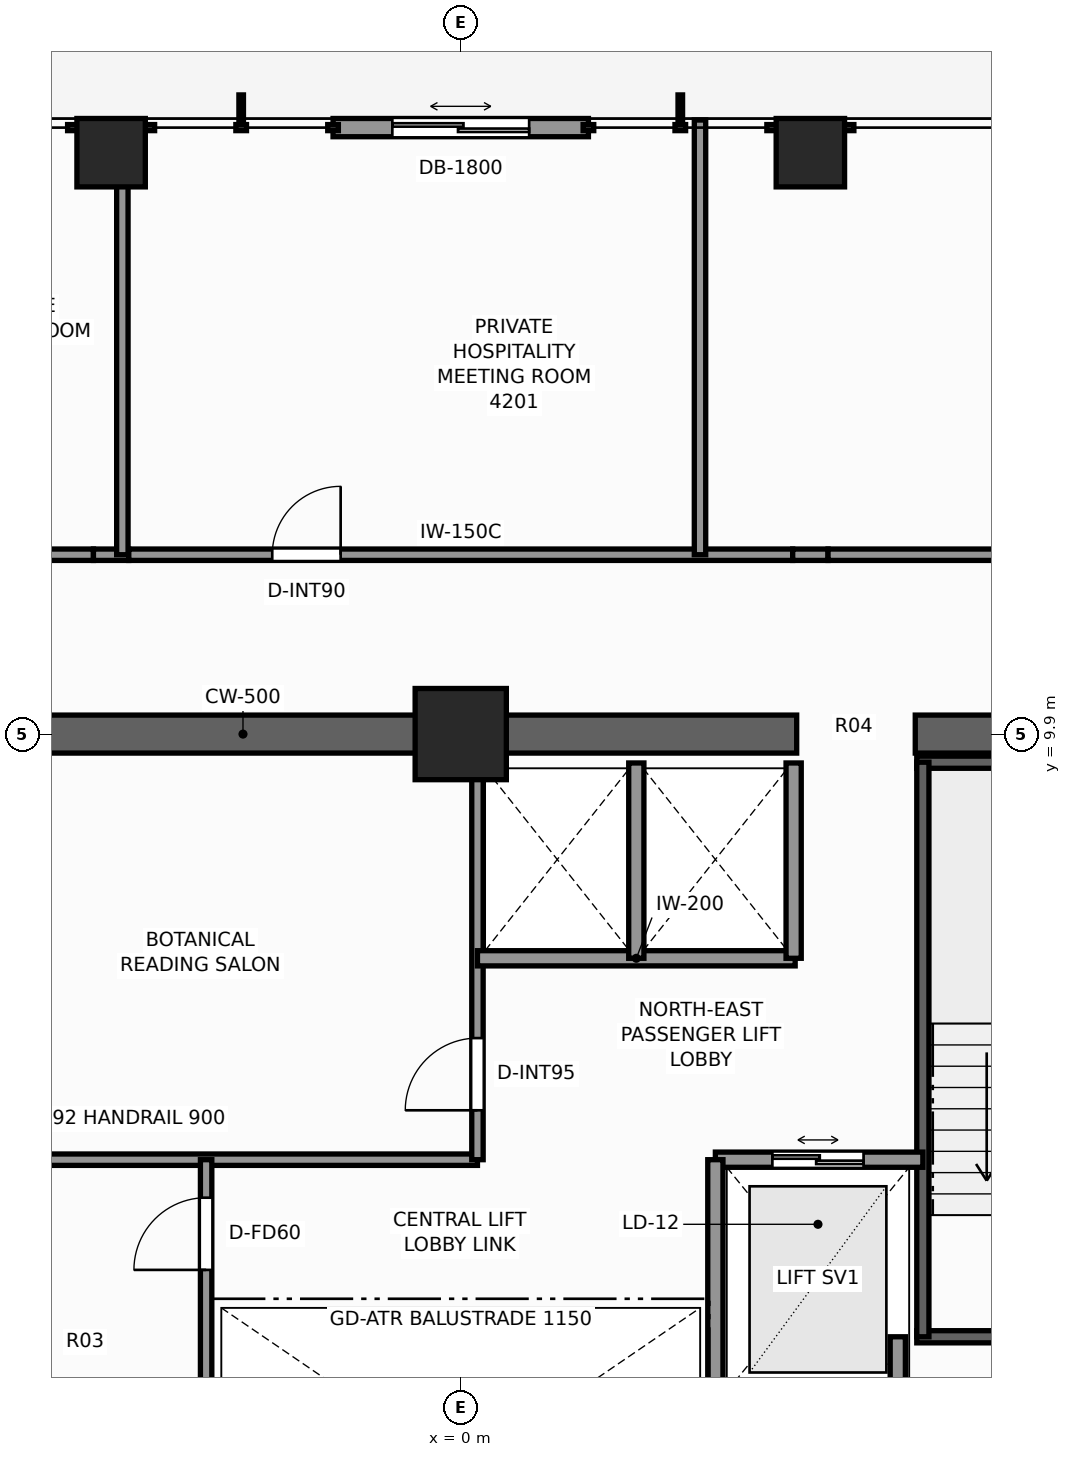
"""IFC4 building model, lengths in metres.
Left out: names, types, materials, properties, quantities, classifications, styles, units other than length and angle.
Written with IfcOpenShell. Run it as: python <this file> out.ifc"""

import sys

from ifc_helpers import new_model, si_unit, direction, frame, frame_2d, origin, origin_2d, place, context, subcontext, project, spatial, rectangle, extrude, element, fill, save


model = new_model("IFC4")
c1 = context("Model", 3, precision=1e-05, world=origin(), true_north=direction((0.0, 1.0)))
c2 = subcontext(c1, "Body", "Model", "MODEL_VIEW")
j1 = project(units=[si_unit("LENGTHUNIT", "METRE"), si_unit("PLANEANGLEUNIT", "RADIAN")], contexts=[c1])
p1 = place(None, origin())
s1 = spatial("IfcSite", under=j1, at=p1, CompositionType="ELEMENT")
p2 = place(p1, origin())
s2 = spatial("IfcBuilding", under=s1, at=p2, CompositionType="ELEMENT")
p3 = place(p2, frame((0.0, 0.0, 144.8)))
s3 = spatial("IfcBuildingStorey", under=s2, at=p3, CompositionType="ELEMENT", Elevation=144.8)
p4 = place(p3, frame((-10.15, 9.9, 0.0), z_axis=(0.0, 0.0, 1.0), x_axis=(1.0, 0.0, 0.0)))
e1 = element("IfcWall", 1, at=p4, inside=s3, PredefinedType="SHEAR", context=c2, shape_type="SweptSolid", body=[
    extrude(rectangle(XDim=14.57, YDim=0.5, at=frame_2d((7.285, 0.0))), origin(), (0.0, 0.0, 1.0), 3.3),
])
p5 = place(p3, frame((5.98, 9.9, 0.0), z_axis=(0.0, 0.0, 1.0), x_axis=(1.0, 0.0, 0.0)))
e2 = element("IfcWall", 2, at=p5, inside=s3, PredefinedType="SHEAR", context=c2, shape_type="SweptSolid", body=[
    extrude(rectangle(XDim=4.17, YDim=0.5, at=frame_2d((2.085, 0.0))), origin(), (0.0, 0.0, 1.0), 3.3),
])
p6 = place(p3, frame((0.0, 9.9, 0.0), z_axis=(0.0, 0.0, 1.0), x_axis=(1.0, 0.0, 0.0)))
e3 = element("IfcColumn", 3, at=p6, inside=s3, PredefinedType="COLUMN", context=c2, shape_type="SweptSolid", body=[
    extrude(rectangle(XDim=1.2, YDim=1.2, at=origin_2d()), origin(), (0.0, 0.0, 1.0), 3.3),
])
for number, where, z_axis, x_axis in (
    (4, (-4.6, 17.55, 0.0), (0.0, 0.0, 1.0), (1.0, 0.0, 0.0)),
    (5, (4.6, 17.55, 0.0), (0.0, 0.0, 1.0), (1.0, 0.0, 0.0)),
):
    element("IfcColumn", number, at=place(p3, frame(where, z_axis=z_axis, x_axis=x_axis)), inside=s3, PredefinedType="COLUMN", context=c2, shape_type="SweptSolid", body=[
        extrude(rectangle(XDim=0.9, YDim=0.9, at=origin_2d()), origin(), (0.0, 0.0, 1.0), 3.3),
    ])
p7 = place(p3, frame((-1.68, 17.88, 0.0), z_axis=(0.0, 0.0, 1.0), x_axis=(1.0, 0.0, 0.0)))
e6 = element("IfcWall", 6, at=p7, inside=s3, PredefinedType="STANDARD", context=c2, shape_type="SweptSolid", body=[
    extrude(rectangle(XDim=3.36, YDim=0.24, at=frame_2d((1.68, 0.0))), origin(), (0.0, 0.0, 1.0), 2.95),
])
p8 = place(p7, frame((0.78, 0.0, 0.0)))
e7 = element("IfcOpeningElement", 7, at=p8, cuts=e6, PredefinedType="OPENING", context=c2, shape_type="SweptSolid", body=[
    extrude(rectangle(XDim=1.8, YDim=2.2, at=frame_2d((0.9, 1.1))), frame((0.0, 0.13, 0.0), z_axis=(0.0, -1.0, 0.0), x_axis=(1.0, 0.0, 0.0)), (0.0, 0.0, 1.0), 0.26),
])
p9 = place(p3, frame((6.0, 1.97, 0.0), z_axis=(0.0, 0.0, 1.0), x_axis=(1.0, 0.0, 0.0)))
e8 = element("IfcWall", 8, at=p9, inside=s3, PredefinedType="SHEAR", context=c2, shape_type="SweptSolid", body=[
    extrude(rectangle(XDim=3.52, YDim=0.16, at=frame_2d((1.76, 0.0))), origin(), (0.0, 0.0, 1.0), 3.3),
])
p10 = place(p9, frame((1.15, 0.0, 0.0)))
e9 = element("IfcOpeningElement", 9, at=p10, cuts=e8, PredefinedType="OPENING", context=c2, shape_type="SweptSolid", body=[
    extrude(rectangle(XDim=1.1, YDim=2.2, at=frame_2d((0.55, 1.1))), frame((0.0, 0.09, 0.0), z_axis=(0.0, -1.0, 0.0), x_axis=(1.0, 0.0, 0.0)), (0.0, 0.0, 1.0), 0.18),
])
p11 = place(p3, frame((6.0, 9.53, 0.0), z_axis=(0.0, 0.0, 1.0), x_axis=(1.0, 0.0, 0.0)))
e10 = element("IfcWall", 10, at=p11, inside=s3, PredefinedType="SHEAR", context=c2, shape_type="SweptSolid", body=[
    extrude(rectangle(XDim=3.52, YDim=0.16, at=frame_2d((1.76, 0.0))), origin(), (0.0, 0.0, 1.0), 3.3),
])
p12 = place(p3, frame((6.08, 1.97, 0.0), z_axis=(0.0, 0.0, 1.0), x_axis=(0.0, 1.0, 0.0)))
e11 = element("IfcWall", 11, at=p12, inside=s3, PredefinedType="SHEAR", context=c2, shape_type="SweptSolid", body=[
    extrude(rectangle(XDim=7.56, YDim=0.16, at=frame_2d((3.78, 0.0))), origin(), (0.0, 0.0, 1.0), 3.3),
])
p13 = place(p3, frame((5.75, -3.6, 0.0), z_axis=(0.0, 0.0, 1.0), x_axis=(0.0, 1.0, 0.0)))
e12 = element("IfcWall", 12, at=p13, inside=s3, PredefinedType="SOLIDWALL", context=c2, shape_type="SweptSolid", body=[
    extrude(rectangle(XDim=5.57, YDim=0.2, at=frame_2d((2.785, 0.0))), origin(), (0.0, 0.0, 1.0), 2.585),
])
p14 = place(p13, frame((2.75, 0.0, 0.0)))
e13 = element("IfcOpeningElement", 13, at=p14, cuts=e12, PredefinedType="OPENING", context=c2, shape_type="SweptSolid", body=[
    extrude(rectangle(XDim=1.1, YDim=2.2, at=frame_2d((0.55, 1.1))), frame((0.0, 0.11, 0.0), z_axis=(0.0, -1.0, 0.0), x_axis=(1.0, 0.0, 0.0)), (0.0, 0.0, 1.0), 0.22),
])
p15 = place(p3, frame((3.35, 4.3, 0.0), z_axis=(0.0, 0.0, 1.0), x_axis=(1.0, 0.0, 0.0)))
e14 = element("IfcWall", 14, at=p15, inside=s3, PredefinedType="SOLIDWALL", context=c2, shape_type="SweptSolid", body=[
    extrude(rectangle(XDim=2.73, YDim=0.2, at=frame_2d((1.365, 0.0))), origin(), (0.0, 0.0, 1.0), 2.95),
])
p16 = place(p15, frame((0.75, 0.0, 0.0)))
e15 = element("IfcOpeningElement", 15, at=p16, cuts=e14, PredefinedType="OPENING", context=c2, shape_type="SweptSolid", body=[
    extrude(rectangle(XDim=1.2, YDim=2.25, at=frame_2d((0.6, 1.125))), frame((0.0, 0.11, 0.0), z_axis=(0.0, -1.0, 0.0), x_axis=(1.0, 0.0, 0.0)), (0.0, 0.0, 1.0), 0.22),
])
p17 = place(p3, frame((3.35, 1.1, 0.0), z_axis=(0.0, 0.0, 1.0), x_axis=(0.0, 1.0, 0.0)))
e16 = element("IfcWall", 16, at=p17, inside=s3, PredefinedType="SOLIDWALL", context=c2, shape_type="SweptSolid", body=[
    extrude(rectangle(XDim=3.2, YDim=0.2, at=frame_2d((1.6, 0.0))), origin(), (0.0, 0.0, 1.0), 2.585),
])
p18 = place(p3, frame((-6.08, 4.3, 0.0), z_axis=(0.0, 0.0, 1.0), x_axis=(1.0, 0.0, 0.0)))
e17 = element("IfcWall", 17, at=p18, inside=s3, PredefinedType="PARTITIONING", context=c2, shape_type="SweptSolid", body=[
    extrude(rectangle(XDim=6.3, YDim=0.15, at=frame_2d((3.15, 0.0))), origin(), (0.0, 0.0, 1.0), 2.95),
])
p19 = place(p3, frame((0.22, 4.3, 0.0), z_axis=(0.0, 0.0, 1.0), x_axis=(0.0, 1.0, 0.0)))
e18 = element("IfcWall", 18, at=p19, inside=s3, PredefinedType="PARTITIONING", context=c2, shape_type="SweptSolid", body=[
    extrude(rectangle(XDim=5.22, YDim=0.15, at=frame_2d((2.61, 0.0))), origin(), (0.0, 0.0, 1.0), 2.95),
])
p20 = place(p19, frame((0.65, 0.0, 0.0)))
e19 = element("IfcOpeningElement", 19, at=p20, cuts=e18, PredefinedType="OPENING", context=c2, shape_type="SweptSolid", body=[
    extrude(rectangle(XDim=0.95, YDim=2.06, at=frame_2d((0.475, 1.03))), frame((0.0, 0.085, 0.0), z_axis=(0.0, -1.0, 0.0), x_axis=(1.0, 0.0, 0.0)), (0.0, 0.0, 1.0), 0.17),
])
p21 = place(p3, frame((0.22, 6.95, 0.0), z_axis=(0.0, 0.0, 1.0), x_axis=(1.0, 0.0, 0.0)))
e20 = element("IfcWall", 20, at=p21, inside=s3, PredefinedType="SOLIDWALL", context=c2, shape_type="SweptSolid", body=[
    extrude(rectangle(XDim=4.18, YDim=0.2, at=frame_2d((2.09, 0.0))), origin(), (0.0, 0.0, 1.0), 2.95),
])
for number, where, z_axis, x_axis in (
    (21, (4.38, 6.95, 0.0), (0.0, 0.0, 1.0), (0.0, 1.0, 0.0)),
    (22, (2.31, 6.95, 0.0), (0.0, 0.0, 1.0), (0.0, 1.0, 0.0)),
):
    element("IfcWall", number, at=place(p3, frame(where, z_axis=z_axis, x_axis=x_axis)), inside=s3, PredefinedType="SOLIDWALL", context=c2, shape_type="SweptSolid", body=[
        extrude(rectangle(XDim=2.57, YDim=0.2, at=frame_2d((1.285, 0.0))), origin(), (0.0, 0.0, 1.0), 2.95),
    ])
p22 = place(p3, frame((-3.35, 1.1, 0.0), z_axis=(0.0, 0.0, 1.0), x_axis=(0.0, 1.0, 0.0)))
e23 = element("IfcWall", 23, at=p22, inside=s3, PredefinedType="PARTITIONING", context=c2, shape_type="SweptSolid", body=[
    extrude(rectangle(XDim=3.2, YDim=0.15, at=frame_2d((1.6, 0.0))), origin(), (0.0, 0.0, 1.0), 2.585),
])
p23 = place(p22, frame((1.75, 0.0, 0.0)))
e24 = element("IfcOpeningElement", 24, at=p23, cuts=e23, PredefinedType="OPENING", context=c2, shape_type="SweptSolid", body=[
    extrude(rectangle(XDim=0.95, YDim=2.06, at=frame_2d((0.475, 1.03))), frame((0.0, 0.085, 0.0), z_axis=(0.0, -1.0, 0.0), x_axis=(1.0, 0.0, 0.0)), (0.0, 0.0, 1.0), 0.17),
])
p24 = place(p3, frame((-10.211, 12.26, 0.0), z_axis=(0.0, 0.0, 1.0), x_axis=(1.0, 0.0, 0.0)))
e25 = element("IfcWall", 25, at=p24, inside=s3, PredefinedType="PARTITIONING", context=c2, shape_type="SweptSolid", body=[
    extrude(rectangle(XDim=5.379, YDim=0.15, at=frame_2d((2.689, 0.0))), origin(), (0.0, 0.0, 1.0), 2.95),
])
p25 = place(p24, frame((0.856, 0.0, 0.0)))
e26 = element("IfcOpeningElement", 26, at=p25, cuts=e25, PredefinedType="OPENING", context=c2, shape_type="SweptSolid", body=[
    extrude(rectangle(XDim=0.9, YDim=2.06, at=frame_2d((0.45, 1.03))), frame((0.0, 0.085, 0.0), z_axis=(0.0, -1.0, 0.0), x_axis=(1.0, 0.0, 0.0)), (0.0, 0.0, 1.0), 0.17),
])
p26 = place(p24, frame((3.346, 0.0, 0.0)))
e27 = element("IfcOpeningElement", 27, at=p26, cuts=e25, PredefinedType="OPENING", context=c2, shape_type="SweptSolid", body=[
    extrude(rectangle(XDim=0.95, YDim=2.06, at=frame_2d((0.475, 1.03))), frame((0.0, 0.085, 0.0), z_axis=(0.0, -1.0, 0.0), x_axis=(1.0, 0.0, 0.0)), (0.0, 0.0, 1.0), 0.17),
])
p27 = place(p3, frame((-4.833, 12.26, 0.0), z_axis=(0.0, 0.0, 1.0), x_axis=(1.0, 0.0, 0.0)))
e28 = element("IfcWall", 28, at=p27, inside=s3, PredefinedType="PARTITIONING", context=c2, shape_type="SweptSolid", body=[
    extrude(rectangle(XDim=0.465, YDim=0.15, at=frame_2d((0.232, 0.0))), origin(), (0.0, 0.0, 1.0), 2.162),
])
p28 = place(p3, frame((-4.367, 12.26, 0.0), z_axis=(0.0, 0.0, 1.0), x_axis=(1.0, 0.0, 0.0)))
e29 = element("IfcWall", 29, at=p28, inside=s3, PredefinedType="PARTITIONING", context=c2, shape_type="SweptSolid", body=[
    extrude(rectangle(XDim=8.735, YDim=0.15, at=frame_2d((4.367, 0.0))), origin(), (0.0, 0.0, 1.0), 2.475),
])
p29 = place(p28, frame((1.887, 0.0, 0.0)))
e30 = element("IfcOpeningElement", 30, at=p29, cuts=e29, PredefinedType="OPENING", context=c2, shape_type="SweptSolid", body=[
    extrude(rectangle(XDim=0.9, YDim=2.06, at=frame_2d((0.45, 1.03))), frame((0.0, 0.085, 0.0), z_axis=(0.0, -1.0, 0.0), x_axis=(1.0, 0.0, 0.0)), (0.0, 0.0, 1.0), 0.17),
])
p30 = place(p3, frame((4.367, 12.26, 0.0), z_axis=(0.0, 0.0, 1.0), x_axis=(1.0, 0.0, 0.0)))
e31 = element("IfcWall", 31, at=p30, inside=s3, PredefinedType="PARTITIONING", context=c2, shape_type="SweptSolid", body=[
    extrude(rectangle(XDim=0.465, YDim=0.15, at=frame_2d((0.232, 0.0))), origin(), (0.0, 0.0, 1.0), 2.162),
])
p31 = place(p3, frame((4.833, 12.26, 0.0), z_axis=(0.0, 0.0, 1.0), x_axis=(1.0, 0.0, 0.0)))
e32 = element("IfcWall", 32, at=p31, inside=s3, PredefinedType="PARTITIONING", context=c2, shape_type="SweptSolid", body=[
    extrude(rectangle(XDim=5.379, YDim=0.15, at=frame_2d((2.689, 0.0))), origin(), (0.0, 0.0, 1.0), 2.95),
])
p32 = place(p31, frame((2.252, 0.0, 0.0)))
e33 = element("IfcOpeningElement", 33, at=p32, cuts=e32, PredefinedType="OPENING", context=c2, shape_type="SweptSolid", body=[
    extrude(rectangle(XDim=0.9, YDim=2.06, at=frame_2d((0.45, 1.03))), frame((0.0, 0.085, 0.0), z_axis=(0.0, -1.0, 0.0), x_axis=(1.0, 0.0, 0.0)), (0.0, 0.0, 1.0), 0.17),
])
p33 = place(p3, frame((-4.452, 12.26, 0.0), z_axis=(0.0, 0.0, 1.0), x_axis=(0.0, 1.0, 0.0)))
e34 = element("IfcWall", 34, at=p33, inside=s3, PredefinedType="PARTITIONING", context=c2, shape_type="SweptSolid", body=[
    extrude(rectangle(XDim=5.117, YDim=0.15, at=frame_2d((2.559, 0.0))), origin(), (0.0, 0.0, 1.0), 2.162),
])
p34 = place(p3, frame((-4.452, 17.377, 0.0), z_axis=(0.0, 0.0, 1.0), x_axis=(0.0, 1.0, 0.0)))
e35 = element("IfcWall", 35, at=p34, inside=s3, PredefinedType="PARTITIONING", context=c2, shape_type="SweptSolid", body=[
    extrude(rectangle(XDim=0.603, YDim=0.15, at=frame_2d((0.301, 0.0))), origin(), (0.0, 0.0, 1.0), 2.319),
])
p35 = place(p3, frame((3.148, 12.26, 0.0), z_axis=(0.0, 0.0, 1.0), x_axis=(0.0, 1.0, 0.0)))
e36 = element("IfcWall", 36, at=p35, inside=s3, PredefinedType="PARTITIONING", context=c2, shape_type="SweptSolid", body=[
    extrude(rectangle(XDim=5.72, YDim=0.15, at=frame_2d((2.86, 0.0))), origin(), (0.0, 0.0, 1.0), 2.319),
])
p36 = place(p8, origin())
e37 = element("IfcDoor", 37, at=p36, inside=s3, OperationType="DOUBLE_DOOR_SLIDING", PredefinedType="DOOR", context=c2, shape_type="SweptSolid", body=[
    extrude(rectangle(XDim=1.8, YDim=2.2, at=frame_2d((0.9, 1.1))), frame((0.0, 0.025, 0.0), z_axis=(0.0, -1.0, 0.0), x_axis=(1.0, 0.0, 0.0)), (0.0, 0.0, 1.0), 0.05),
])
fill(e7, e37)
p37 = place(p16, origin())
e38 = element("IfcDoor", 38, at=p37, inside=s3, OperationType="DOUBLE_DOOR_SLIDING", PredefinedType="DOOR", context=c2, shape_type="SweptSolid", body=[
    extrude(rectangle(XDim=1.2, YDim=2.25, at=frame_2d((0.6, 1.125))), frame((0.0, 0.025, 0.0), z_axis=(0.0, -1.0, 0.0), x_axis=(1.0, 0.0, 0.0)), (0.0, 0.0, 1.0), 0.05),
])
fill(e15, e38)
p38 = place(p20, origin())
e39 = element("IfcDoor", 39, at=p38, inside=s3, OperationType="SINGLE_SWING_LEFT", PredefinedType="DOOR", context=c2, shape_type="SweptSolid", body=[
    extrude(rectangle(XDim=0.95, YDim=2.06, at=frame_2d((0.475, 1.03))), frame((0.0, 0.025, 0.0), z_axis=(0.0, -1.0, 0.0), x_axis=(1.0, 0.0, 0.0)), (0.0, 0.0, 1.0), 0.05),
])
fill(e19, e39)
p39 = place(p23, origin())
e40 = element("IfcDoor", 40, at=p39, inside=s3, OperationType="SINGLE_SWING_LEFT", PredefinedType="DOOR", context=c2, shape_type="SweptSolid", body=[
    extrude(rectangle(XDim=0.95, YDim=2.06, at=frame_2d((0.475, 1.03))), frame((0.0, 0.025, 0.0), z_axis=(0.0, -1.0, 0.0), x_axis=(1.0, 0.0, 0.0)), (0.0, 0.0, 1.0), 0.05),
])
fill(e24, e40)
p40 = place(p29, origin())
e41 = element("IfcDoor", 41, at=p40, inside=s3, OperationType="SINGLE_SWING_RIGHT", PredefinedType="DOOR", context=c2, shape_type="SweptSolid", body=[
    extrude(rectangle(XDim=0.9, YDim=2.06, at=frame_2d((0.45, 1.03))), frame((0.0, 0.025, 0.0), z_axis=(0.0, -1.0, 0.0), x_axis=(1.0, 0.0, 0.0)), (0.0, 0.0, 1.0), 0.05),
])
fill(e30, e41)
save(model, sys.argv[1])
